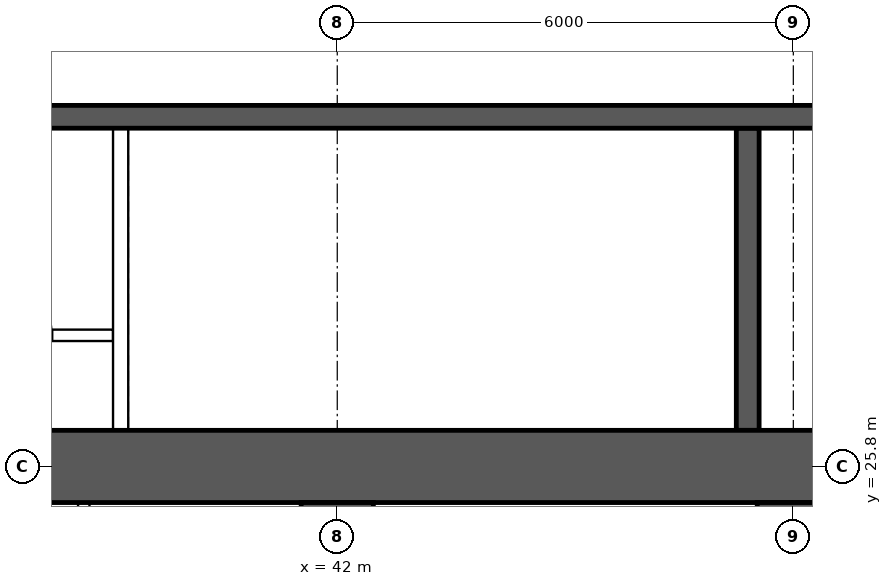
"""IFC4 building model, lengths in metres.
Left out: names, types, materials, properties, quantities, classifications, styles, units other than length and angle.
Written with IfcOpenShell. Run it as: python <this file> out.ifc"""

import sys

from ifc_helpers import new_model, si_unit, direction, frame, frame_2d, origin, place, context, subcontext, project, spatial, rectangle, extrude, element, save


model = new_model("IFC4")
c1 = context("Model", 3, precision=1e-05, world=origin(), true_north=direction((0.0, 1.0)))
c2 = subcontext(c1, "Body", "Model", "MODEL_VIEW")
j1 = project(units=[si_unit("LENGTHUNIT", "METRE"), si_unit("PLANEANGLEUNIT", "RADIAN")], contexts=[c1])
p1 = place(None, origin())
s1 = spatial("IfcSite", under=j1, at=p1, CompositionType="ELEMENT")
p2 = place(p1, origin())
s2 = spatial("IfcBuilding", under=s1, at=p2, CompositionType="ELEMENT")
p3 = place(p2, frame((0.0, 0.0, 118.15)))
s3 = spatial("IfcBuildingStorey", under=s2, at=p3, CompositionType="ELEMENT", Elevation=118.15)
p4 = place(p3, frame((18.0, 25.8, 0.0), z_axis=(0.0, 0.0, 1.0), x_axis=(1.0, 0.0, 0.0)))
e1 = element("IfcWall", 1, at=p4, inside=s3, PredefinedType="SHEAR", context=c2, shape_type="SweptSolid", body=[
    extrude(rectangle(XDim=48.0, YDim=0.95, at=frame_2d((24.0, 0.0))), origin(), (0.0, 0.0, 1.0), 3.75),
])
p5 = place(p3, frame((18.475, 30.4, 0.0), z_axis=(0.0, 0.0, 1.0), x_axis=(1.0, 0.0, 0.0)))
e2 = element("IfcWall", 2, at=p5, inside=s3, PredefinedType="SHEAR", context=c2, shape_type="SweptSolid", body=[
    extrude(rectangle(XDim=47.05, YDim=0.3, at=frame_2d((23.525, 0.0))), origin(), (0.0, 0.0, 1.0), 3.75),
])
p6 = place(p5, frame((0.4, 0.0, 0.0)))
e3 = element("IfcOpeningElement", 3, at=p6, cuts=e2, PredefinedType="OPENING", context=c2, shape_type="SweptSolid", body=[
    extrude(rectangle(XDim=1.0, YDim=2.1, at=frame_2d((0.5, 1.05))), frame((0.0, 0.16, 0.0), z_axis=(0.0, -1.0, 0.0), x_axis=(1.0, 0.0, 0.0)), (0.0, 0.0, 1.0), 0.32),
])
p7 = place(p5, frame((45.65, 0.0, 0.0)))
e4 = element("IfcOpeningElement", 4, at=p7, cuts=e2, PredefinedType="OPENING", context=c2, shape_type="SweptSolid", body=[
    extrude(rectangle(XDim=1.0, YDim=2.1, at=frame_2d((0.5, 1.05))), frame((0.0, 0.16, 0.0), z_axis=(0.0, -1.0, 0.0), x_axis=(1.0, 0.0, 0.0)), (0.0, 0.0, 1.0), 0.32),
])
p8 = place(p5, frame((8.275, 0.0, 0.0)))
e5 = element("IfcOpeningElement", 5, at=p8, cuts=e2, PredefinedType="OPENING", context=c2, shape_type="SweptSolid", body=[
    extrude(rectangle(XDim=1.1, YDim=2.1, at=frame_2d((0.55, 1.05))), frame((0.0, 0.16, 0.0), z_axis=(0.0, -1.0, 0.0), x_axis=(1.0, 0.0, 0.0)), (0.0, 0.0, 1.0), 0.32),
])
p9 = place(p5, frame((10.875, 0.0, 0.0)))
e6 = element("IfcOpeningElement", 6, at=p9, cuts=e2, PredefinedType="OPENING", context=c2, shape_type="SweptSolid", body=[
    extrude(rectangle(XDim=1.1, YDim=2.1, at=frame_2d((0.55, 1.05))), frame((0.0, 0.16, 0.0), z_axis=(0.0, -1.0, 0.0), x_axis=(1.0, 0.0, 0.0)), (0.0, 0.0, 1.0), 0.32),
])
p10 = place(p5, frame((13.475, 0.0, 0.0)))
e7 = element("IfcOpeningElement", 7, at=p10, cuts=e2, PredefinedType="OPENING", context=c2, shape_type="SweptSolid", body=[
    extrude(rectangle(XDim=1.1, YDim=2.1, at=frame_2d((0.55, 1.05))), frame((0.0, 0.16, 0.0), z_axis=(0.0, -1.0, 0.0), x_axis=(1.0, 0.0, 0.0)), (0.0, 0.0, 1.0), 0.32),
])
p11 = place(p5, frame((16.075, 0.0, 0.0)))
e8 = element("IfcOpeningElement", 8, at=p11, cuts=e2, PredefinedType="OPENING", context=c2, shape_type="SweptSolid", body=[
    extrude(rectangle(XDim=1.1, YDim=2.1, at=frame_2d((0.55, 1.05))), frame((0.0, 0.16, 0.0), z_axis=(0.0, -1.0, 0.0), x_axis=(1.0, 0.0, 0.0)), (0.0, 0.0, 1.0), 0.32),
])
p12 = place(p5, frame((18.85, 0.0, 0.0)))
e9 = element("IfcOpeningElement", 9, at=p12, cuts=e2, PredefinedType="OPENING", context=c2, shape_type="SweptSolid", body=[
    extrude(rectangle(XDim=0.9, YDim=2.1, at=frame_2d((0.45, 1.05))), frame((0.0, 0.16, 0.0), z_axis=(0.0, -1.0, 0.0), x_axis=(1.0, 0.0, 0.0)), (0.0, 0.0, 1.0), 0.32),
])
p13 = place(p5, frame((30.142, 0.0, 0.0)))
e10 = element("IfcOpeningElement", 10, at=p13, cuts=e2, PredefinedType="OPENING", context=c2, shape_type="SweptSolid", body=[
    extrude(rectangle(XDim=1.1, YDim=2.1, at=frame_2d((0.55, 1.05))), frame((0.0, 0.16, 0.0), z_axis=(0.0, -1.0, 0.0), x_axis=(1.0, 0.0, 0.0)), (0.0, 0.0, 1.0), 0.32),
])
p14 = place(p5, frame((33.675, 0.0, 0.0)))
e11 = element("IfcOpeningElement", 11, at=p14, cuts=e2, PredefinedType="OPENING", context=c2, shape_type="SweptSolid", body=[
    extrude(rectangle(XDim=1.1, YDim=2.1, at=frame_2d((0.55, 1.05))), frame((0.0, 0.16, 0.0), z_axis=(0.0, -1.0, 0.0), x_axis=(1.0, 0.0, 0.0)), (0.0, 0.0, 1.0), 0.32),
])
p15 = place(p5, frame((37.208, 0.0, 0.0)))
e12 = element("IfcOpeningElement", 12, at=p15, cuts=e2, PredefinedType="OPENING", context=c2, shape_type="SweptSolid", body=[
    extrude(rectangle(XDim=1.1, YDim=2.1, at=frame_2d((0.55, 1.05))), frame((0.0, 0.16, 0.0), z_axis=(0.0, -1.0, 0.0), x_axis=(1.0, 0.0, 0.0)), (0.0, 0.0, 1.0), 0.32),
])
p16 = place(p3, frame((47.4, 26.275, 0.0), z_axis=(0.0, 0.0, 1.0), x_axis=(0.0, 1.0, 0.0)))
e13 = element("IfcWall", 13, at=p16, inside=s3, PredefinedType="SHEAR", context=c2, shape_type="SweptSolid", body=[
    extrude(rectangle(XDim=3.975, YDim=0.3, at=frame_2d((1.988, 0.0))), origin(), (0.0, 0.0, 1.0), 3.75),
])
for number, where, z_axis, x_axis in (
    (14, (42.0, 16.0, 0.0), (0.0, 0.0, 1.0), (0.0, 1.0, 0.0)),
    (15, (48.0, 16.0, 0.0), (0.0, 0.0, 1.0), (0.0, 1.0, 0.0)),
):
    element("IfcWall", number, at=place(p3, frame(where, z_axis=z_axis, x_axis=x_axis)), inside=s3, PredefinedType="SHEAR", context=c2, shape_type="SweptSolid", body=[
        extrude(rectangle(XDim=9.325, YDim=0.95, at=frame_2d((4.663, 0.0))), origin(), (0.0, 0.0, 1.0), 3.75),
    ])
p17 = place(p3, frame((36.55, 27.525, 0.0), z_axis=(0.0, 0.0, 1.0), x_axis=(1.0, 0.0, 0.0)))
e16 = element("IfcWall", 16, at=p17, inside=s3, PredefinedType="SOLIDWALL", context=c2, shape_type="SweptSolid", body=[
    extrude(rectangle(XDim=2.5, YDim=0.15, at=frame_2d((1.25, 0.0))), origin(), (0.0, 0.0, 1.0), 3.5),
])
p18 = place(p17, frame((0.8, 0.0, 0.0)))
e17 = element("IfcOpeningElement", 17, at=p18, cuts=e16, PredefinedType="OPENING", context=c2, shape_type="SweptSolid", body=[
    extrude(rectangle(XDim=0.9, YDim=2.1, at=frame_2d((0.45, 1.05))), frame((0.0, 0.085, 0.0), z_axis=(0.0, -1.0, 0.0), x_axis=(1.0, 0.0, 0.0)), (0.0, 0.0, 1.0), 0.17),
])
p19 = place(p3, frame((39.15, 26.275, 0.0), z_axis=(0.0, 0.0, 1.0), x_axis=(0.0, 1.0, 0.0)))
e18 = element("IfcWall", 18, at=p19, inside=s3, PredefinedType="SOLIDWALL", context=c2, shape_type="SweptSolid", body=[
    extrude(rectangle(XDim=3.975, YDim=0.2, at=frame_2d((1.988, 0.0))), origin(), (0.0, 0.0, 1.0), 3.5),
])
p20 = place(p3, frame((38.665, 16.1, 0.0), z_axis=(0.0, 0.0, 1.0), x_axis=(0.0, 1.0, 0.0)))
e19 = element("IfcWall", 19, at=p20, inside=s3, PredefinedType="PARTITIONING", context=c2, shape_type="SweptSolid", body=[
    extrude(rectangle(XDim=9.225, YDim=0.15, at=frame_2d((4.612, 0.0))), origin(), (0.0, 0.0, 1.0), 3.5),
])
save(model, sys.argv[1])
